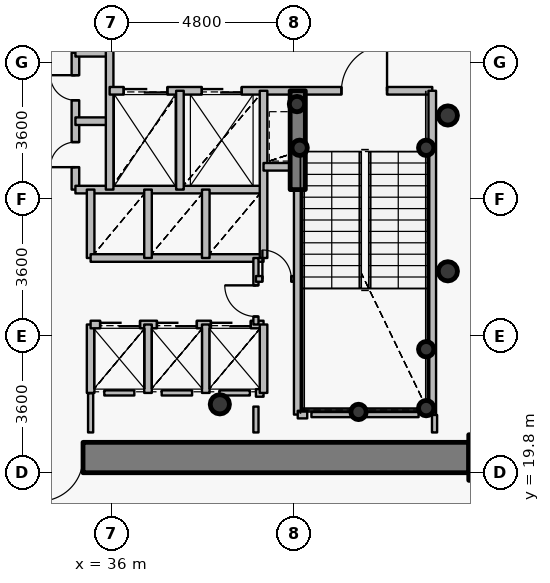
"""IFC4 building model, lengths in metres.
Left out: names, types, materials, properties, quantities, classifications, styles, units other than length and angle.
Written with IfcOpenShell. Run it as: python <this file> out.ifc"""

import sys

from ifc_helpers import new_model, si_unit, direction, frame, frame_2d, origin, origin_2d, place, context, subcontext, project, spatial, rectangle, hollow_circle, extrude, source, transform, mapped, element, fill, save


model = new_model("IFC4")
c1 = context("Model", 3, precision=1e-05, world=origin(), true_north=direction((0.0, 1.0)))
c2 = subcontext(c1, "Body", "Model", "MODEL_VIEW")
j1 = project(units=[si_unit("LENGTHUNIT", "METRE"), si_unit("PLANEANGLEUNIT", "RADIAN")], contexts=[c1])
p1 = place(None, origin())
s1 = spatial("IfcSite", under=j1, at=p1, CompositionType="ELEMENT")
p2 = place(p1, origin())
s2 = spatial("IfcBuilding", under=s1, at=p2, CompositionType="ELEMENT")
p3 = place(p2, frame((0.0, 0.0, 104.7)))
s3 = spatial("IfcBuildingStorey", under=s2, at=p3, CompositionType="ELEMENT", Elevation=104.7)
p4 = place(p3, frame((46.0, 20.2, 0.0), z_axis=(0.0, 0.0, 1.0), x_axis=(1.0, 0.0, 0.0)))
e1 = element("IfcColumn", 1, at=p4, inside=s3, PredefinedType="COLUMN", context=c2, shape_type="SweptSolid", body=[
    extrude(rectangle(XDim=1.2, YDim=1.2, at=origin_2d()), origin(), (0.0, 0.0, 1.0), 3.75),
])
p5 = place(p3, frame((38.85, 21.6, 0.0), z_axis=(0.0, 0.0, 1.0), x_axis=(1.0, 0.0, 0.0)))
e2 = element("IfcColumn", 2, at=p5, inside=s3, PredefinedType="COLUMN", context=c2, shape_type="SweptSolid", body=[
    extrude(hollow_circle(Radius=0.254, WallThickness=0.02, at=origin_2d()), origin(), (0.0, 0.0, 1.0), 3.75),
])
for number, where, z_axis, x_axis in (
    (3, (44.28, 21.5, 0.0), (0.0, 0.0, 1.0), (1.0, 0.0, 0.0)),
    (4, (44.28, 23.05, 0.0), (0.0, 0.0, 1.0), (1.0, 0.0, 0.0)),
    (5, (42.5, 21.4, 0.0), (0.0, 0.0, 1.0), (1.0, 0.0, 0.0)),
    (6, (40.95, 28.35, 0.0), (0.0, 0.0, 1.0), (1.0, 0.0, 0.0)),
    (7, (44.28, 28.35, 0.0), (0.0, 0.0, 1.0), (1.0, 0.0, 0.0)),
    (8, (40.88, 29.5, 0.0), (0.0, 0.0, 1.0), (1.0, 0.0, 0.0)),
):
    element("IfcColumn", number, at=place(p3, frame(where, z_axis=z_axis, x_axis=x_axis)), inside=s3, PredefinedType="COLUMN", context=c2, shape_type="SweptSolid", body=[
        extrude(hollow_circle(Radius=0.203, WallThickness=0.016, at=origin_2d()), origin(), (0.0, 0.0, 1.0), 3.75),
    ])
p6 = place(p3, frame((45.4, 20.2, 0.0), z_axis=(0.0, 0.0, 1.0), x_axis=(-1.0, 0.0, 0.0)))
e9 = element("IfcWall", 9, at=p6, inside=s3, PredefinedType="SHEAR", context=c2, shape_type="SweptSolid", body=[
    extrude(rectangle(XDim=18.8, YDim=0.8, at=frame_2d((9.4, 0.0))), origin(), (0.0, 0.0, 1.0), 2.95),
])
p7 = place(p6, frame((10.15, 0.0, 0.0)))
e10 = element("IfcOpeningElement", 10, at=p7, cuts=e9, PredefinedType="OPENING", context=c2, shape_type="SweptSolid", body=[
    extrude(rectangle(XDim=1.15, YDim=2.15, at=origin_2d()), frame((0.575, 0.41, 1.075), z_axis=(0.0, -1.0, 0.0), x_axis=(1.0, 0.0, 0.0)), (0.0, 0.0, 1.0), 0.82),
])
p8 = place(p3, frame((40.9, 27.25, 0.0), z_axis=(0.0, 0.0, 1.0), x_axis=(0.0, 1.0, 0.0)))
e11 = element("IfcWall", 11, at=p8, inside=s3, PredefinedType="SHEAR", context=c2, shape_type="SweptSolid", body=[
    extrude(rectangle(XDim=2.6, YDim=0.4, at=frame_2d((1.3, 0.0))), origin(), (0.0, 0.0, 1.0), 3.1),
])
for number, where, z_axis, x_axis in (
    (12, (44.85, 25.1, 0.0), (0.0, 0.0, 1.0), (1.0, 0.0, 0.0)),
    (13, (44.85, 29.2, 0.0), (0.0, 0.0, 1.0), (1.0, 0.0, 0.0)),
):
    element("IfcColumn", number, at=place(p3, frame(where, z_axis=z_axis, x_axis=x_axis)), inside=s3, PredefinedType="COLUMN", context=c2, shape_type="SweptSolid", body=[
        extrude(hollow_circle(Radius=0.254, WallThickness=0.02, at=origin_2d()), origin(), (0.0, 0.0, 1.0), 3.75),
    ])
p9 = place(p3, frame((35.05, 27.25, 0.0), z_axis=(0.0, 0.0, 1.0), x_axis=(0.0, 1.0, 0.0)))
e14 = element("IfcWall", 14, at=p9, inside=s3, PredefinedType="PARTITIONING", context=c2, shape_type="SweptSolid", body=[
    extrude(rectangle(XDim=3.6, YDim=0.2, at=frame_2d((1.8, 0.0))), origin(), (0.0, 0.0, 1.0), 3.5),
])
p10 = place(p9, frame((0.59, 0.0, 0.0)))
e15 = element("IfcOpeningElement", 15, at=p10, cuts=e14, PredefinedType="OPENING", context=c2, shape_type="SweptSolid", body=[
    extrude(rectangle(XDim=0.66, YDim=2.05, at=origin_2d()), frame((0.33, 0.11, 1.025), z_axis=(0.0, -1.0, 0.0), x_axis=(1.0, 0.0, 0.0)), (0.0, 0.0, 1.0), 0.22),
])
p11 = place(p9, frame((2.35, 0.0, 0.0)))
e16 = element("IfcOpeningElement", 16, at=p11, cuts=e14, PredefinedType="OPENING", context=c2, shape_type="SweptSolid", body=[
    extrude(rectangle(XDim=0.66, YDim=2.05, at=origin_2d()), frame((0.33, 0.11, 1.025), z_axis=(0.0, -1.0, 0.0), x_axis=(1.0, 0.0, 0.0)), (0.0, 0.0, 1.0), 0.22),
])
p12 = place(p3, frame((35.05, 27.25, 0.0), z_axis=(0.0, 0.0, 1.0), x_axis=(1.0, 0.0, 0.0)))
e17 = element("IfcWall", 17, at=p12, inside=s3, PredefinedType="PARTITIONING", context=c2, shape_type="SweptSolid", body=[
    extrude(rectangle(XDim=4.95, YDim=0.2, at=frame_2d((2.475, 0.0))), origin(), (0.0, 0.0, 1.0), 3.085),
])
for number, where, z_axis, x_axis in (
    (18, (35.05, 29.05, 0.0), (0.0, 0.0, 1.0), (1.0, 0.0, 0.0)),
    (19, (35.05, 30.85, 0.0), (0.0, 0.0, 1.0), (1.0, 0.0, 0.0)),
):
    element("IfcWall", number, at=place(p3, frame(where, z_axis=z_axis, x_axis=x_axis)), inside=s3, PredefinedType="PARTITIONING", context=c2, shape_type="SweptSolid", body=[
        extrude(rectangle(XDim=0.9, YDim=0.2, at=frame_2d((0.45, 0.0))), origin(), (0.0, 0.0, 1.0), 3.5),
    ])
p13 = place(p3, frame((35.45, 21.9, 0.0), z_axis=(0.0, 0.0, 1.0), x_axis=(0.0, 1.0, 0.0)))
e20 = element("IfcWall", 20, at=p13, inside=s3, PredefinedType="PARTITIONING", context=c2, shape_type="SweptSolid", body=[
    extrude(rectangle(XDim=1.8, YDim=0.2, at=frame_2d((0.9, 0.0))), origin(), (0.0, 0.0, 1.0), 3.5),
])
p14 = place(p3, frame((35.45, 23.7, 0.0), z_axis=(0.0, 0.0, 1.0), x_axis=(1.0, 0.0, 0.0)))
e21 = element("IfcWall", 21, at=p14, inside=s3, PredefinedType="PARTITIONING", context=c2, shape_type="SweptSolid", body=[
    extrude(rectangle(XDim=4.55, YDim=0.2, at=frame_2d((2.275, 0.0))), origin(), (0.0, 0.0, 1.0), 3.085),
])
p15 = place(p14, frame((0.25, 0.0, 0.0)))
e22 = element("IfcOpeningElement", 22, at=p15, cuts=e21, PredefinedType="OPENING", context=c2, shape_type="SweptSolid", body=[
    extrude(rectangle(XDim=1.05, YDim=2.15, at=origin_2d()), frame((0.525, 0.11, 1.075), z_axis=(0.0, -1.0, 0.0), x_axis=(1.0, 0.0, 0.0)), (0.0, 0.0, 1.0), 0.22),
])
p16 = place(p14, frame((1.745, 0.0, 0.0)))
e23 = element("IfcOpeningElement", 23, at=p16, cuts=e21, PredefinedType="OPENING", context=c2, shape_type="SweptSolid", body=[
    extrude(rectangle(XDim=1.05, YDim=2.15, at=origin_2d()), frame((0.525, 0.11, 1.075), z_axis=(0.0, -1.0, 0.0), x_axis=(1.0, 0.0, 0.0)), (0.0, 0.0, 1.0), 0.22),
])
p17 = place(p14, frame((3.165, 0.0, 0.0)))
e24 = element("IfcOpeningElement", 24, at=p17, cuts=e21, PredefinedType="OPENING", context=c2, shape_type="SweptSolid", body=[
    extrude(rectangle(XDim=1.05, YDim=2.15, at=origin_2d()), frame((0.525, 0.11, 1.075), z_axis=(0.0, -1.0, 0.0), x_axis=(1.0, 0.0, 0.0)), (0.0, 0.0, 1.0), 0.22),
])
p18 = place(p3, frame((35.45, 25.45, 0.0), z_axis=(0.0, 0.0, 1.0), x_axis=(0.0, 1.0, 0.0)))
e25 = element("IfcWall", 25, at=p18, inside=s3, PredefinedType="PARTITIONING", context=c2, shape_type="SweptSolid", body=[
    extrude(rectangle(XDim=1.8, YDim=0.2, at=frame_2d((0.9, 0.0))), origin(), (0.0, 0.0, 1.0), 3.5),
])
p19 = place(p3, frame((35.45, 25.45, 0.0), z_axis=(0.0, 0.0, 1.0), x_axis=(1.0, 0.0, 0.0)))
e26 = element("IfcWall", 26, at=p19, inside=s3, PredefinedType="PARTITIONING", context=c2, shape_type="SweptSolid", body=[
    extrude(rectangle(XDim=4.55, YDim=0.2, at=frame_2d((2.275, 0.0))), origin(), (0.0, 0.0, 1.0), 3.085),
])
p20 = place(p3, frame((35.95, 27.25, 0.0), z_axis=(0.0, 0.0, 1.0), x_axis=(0.0, 1.0, 0.0)))
e27 = element("IfcWall", 27, at=p20, inside=s3, PredefinedType="PARTITIONING", context=c2, shape_type="SweptSolid", body=[
    extrude(rectangle(XDim=3.8, YDim=0.2, at=frame_2d((1.9, 0.0))), origin(), (0.0, 0.0, 1.0), 3.5),
])
p21 = place(p3, frame((35.95, 29.85, 0.0), z_axis=(0.0, 0.0, 1.0), x_axis=(1.0, 0.0, 0.0)))
e28 = element("IfcWall", 28, at=p21, inside=s3, PredefinedType="PARTITIONING", context=c2, shape_type="SweptSolid", body=[
    extrude(rectangle(XDim=8.49, YDim=0.2, at=frame_2d((4.245, 0.0))), origin(), (0.0, 0.0, 1.0), 3.085),
])
p22 = place(p21, frame((6.1, 0.0, 0.0)))
e29 = element("IfcOpeningElement", 29, at=p22, cuts=e28, PredefinedType="OPENING", context=c2, shape_type="SweptSolid", body=[
    extrude(rectangle(XDim=1.2, YDim=2.15, at=origin_2d()), frame((0.6, 0.11, 1.075), z_axis=(0.0, -1.0, 0.0), x_axis=(1.0, 0.0, 0.0)), (0.0, 0.0, 1.0), 0.22),
])
p23 = place(p21, frame((0.37, 0.0, 0.0)))
e30 = element("IfcOpeningElement", 30, at=p23, cuts=e28, PredefinedType="OPENING", context=c2, shape_type="SweptSolid", body=[
    extrude(rectangle(XDim=1.15, YDim=2.15, at=origin_2d()), frame((0.575, 0.11, 1.075), z_axis=(0.0, -1.0, 0.0), x_axis=(1.0, 0.0, 0.0)), (0.0, 0.0, 1.0), 0.22),
])
p24 = place(p21, frame((2.425, 0.0, 0.0)))
e31 = element("IfcOpeningElement", 31, at=p24, cuts=e28, PredefinedType="OPENING", context=c2, shape_type="SweptSolid", body=[
    extrude(rectangle(XDim=1.05, YDim=2.15, at=origin_2d()), frame((0.525, 0.11, 1.075), z_axis=(0.0, -1.0, 0.0), x_axis=(1.0, 0.0, 0.0)), (0.0, 0.0, 1.0), 0.22),
])
for number, where, z_axis, x_axis in (
    (32, (36.96, 21.9, 0.0), (0.0, 0.0, 1.0), (0.0, 1.0, 0.0)),
    (33, (36.96, 25.45, 0.0), (0.0, 0.0, 1.0), (0.0, 1.0, 0.0)),
):
    element("IfcWall", number, at=place(p3, frame(where, z_axis=z_axis, x_axis=x_axis)), inside=s3, PredefinedType="PARTITIONING", context=c2, shape_type="SweptSolid", body=[
        extrude(rectangle(XDim=1.8, YDim=0.2, at=frame_2d((0.9, 0.0))), origin(), (0.0, 0.0, 1.0), 3.5),
    ])
p25 = place(p3, frame((37.8, 27.25, 0.0), z_axis=(0.0, 0.0, 1.0), x_axis=(0.0, 1.0, 0.0)))
e34 = element("IfcWall", 34, at=p25, inside=s3, PredefinedType="PARTITIONING", context=c2, shape_type="SweptSolid", body=[
    extrude(rectangle(XDim=2.6, YDim=0.2, at=frame_2d((1.3, 0.0))), origin(), (0.0, 0.0, 1.0), 3.5),
])
for number, where, z_axis, x_axis in (
    (35, (38.48, 21.9, 0.0), (0.0, 0.0, 1.0), (0.0, 1.0, 0.0)),
    (36, (38.48, 25.45, 0.0), (0.0, 0.0, 1.0), (0.0, 1.0, 0.0)),
):
    element("IfcWall", number, at=place(p3, frame(where, z_axis=z_axis, x_axis=x_axis)), inside=s3, PredefinedType="PARTITIONING", context=c2, shape_type="SweptSolid", body=[
        extrude(rectangle(XDim=1.8, YDim=0.2, at=frame_2d((0.9, 0.0))), origin(), (0.0, 0.0, 1.0), 3.5),
    ])
p26 = place(p3, frame((39.8, 21.9, 0.0), z_axis=(0.0, 0.0, 1.0), x_axis=(1.0, 0.0, 0.0)))
e37 = element("IfcWall", 37, at=p26, inside=s3, PredefinedType="PARTITIONING", context=c2, shape_type="SweptSolid", body=[
    extrude(rectangle(XDim=0.2, YDim=0.2, at=frame_2d((0.1, 0.0))), origin(), (0.0, 0.0, 1.0), 3.5),
])
p27 = place(p3, frame((39.8, 23.7, 0.0), z_axis=(0.0, 0.0, 1.0), x_axis=(0.0, 1.0, 0.0)))
e38 = element("IfcWall", 38, at=p27, inside=s3, PredefinedType="PARTITIONING", context=c2, shape_type="SweptSolid", body=[
    extrude(rectangle(XDim=1.75, YDim=0.135, at=frame_2d((0.875, 0.0))), origin(), (0.0, 0.0, 1.0), 3.5),
])
p28 = place(p27, frame((0.21, 0.0, 0.0)))
e39 = element("IfcOpeningElement", 39, at=p28, cuts=e38, PredefinedType="OPENING", context=c2, shape_type="SweptSolid", body=[
    extrude(rectangle(XDim=0.82, YDim=2.1, at=origin_2d()), frame((0.41, 0.078, 1.05), z_axis=(0.0, -1.0, 0.0), x_axis=(1.0, 0.0, 0.0)), (0.0, 0.0, 1.0), 0.155),
])
p29 = place(p3, frame((39.8, 24.9, 0.0), z_axis=(0.0, 0.0, 1.0), x_axis=(1.0, 0.0, 0.0)))
e40 = element("IfcWall", 40, at=p29, inside=s3, PredefinedType="PARTITIONING", context=c2, shape_type="SweptSolid", body=[
    extrude(rectangle(XDim=1.1, YDim=0.15, at=frame_2d((0.55, 0.0))), origin(), (0.0, 0.0, 1.0), 3.5),
])
p30 = place(p29, frame((0.17, 0.0, 0.0)))
e41 = element("IfcOpeningElement", 41, at=p30, cuts=e40, PredefinedType="OPENING", context=c2, shape_type="SweptSolid", body=[
    extrude(rectangle(XDim=0.76, YDim=2.1, at=origin_2d()), frame((0.38, 0.085, 1.05), z_axis=(0.0, -1.0, 0.0), x_axis=(1.0, 0.0, 0.0)), (0.0, 0.0, 1.0), 0.17),
])
p31 = place(p3, frame((40.0, 21.9, 0.0), z_axis=(0.0, 0.0, 1.0), x_axis=(0.0, 1.0, 0.0)))
e42 = element("IfcWall", 42, at=p31, inside=s3, PredefinedType="PARTITIONING", context=c2, shape_type="SweptSolid", body=[
    extrude(rectangle(XDim=1.8, YDim=0.2, at=frame_2d((0.9, 0.0))), origin(), (0.0, 0.0, 1.0), 3.5),
])
p32 = place(p3, frame((40.0, 25.45, 0.0), z_axis=(0.0, 0.0, 1.0), x_axis=(0.0, 1.0, 0.0)))
e43 = element("IfcWall", 43, at=p32, inside=s3, PredefinedType="PARTITIONING", context=c2, shape_type="SweptSolid", body=[
    extrude(rectangle(XDim=4.4, YDim=0.2, at=frame_2d((2.2, 0.0))), origin(), (0.0, 0.0, 1.0), 3.5),
])
p33 = place(p3, frame((40.0, 27.85, 0.0), z_axis=(0.0, 0.0, 1.0), x_axis=(1.0, 0.0, 0.0)))
e44 = element("IfcWall", 44, at=p33, inside=s3, PredefinedType="PARTITIONING", context=c2, shape_type="SweptSolid", body=[
    extrude(rectangle(XDim=0.9, YDim=0.2, at=frame_2d((0.45, 0.0))), origin(), (0.0, 0.0, 1.0), 3.5),
])
p34 = place(p3, frame((40.9, 21.33, 0.0), z_axis=(0.0, 0.0, 1.0), x_axis=(0.0, 1.0, 0.0)))
e45 = element("IfcWall", 45, at=p34, inside=s3, PredefinedType="PARTITIONING", context=c2, shape_type="SweptSolid", body=[
    extrude(rectangle(XDim=5.91, YDim=0.2, at=frame_2d((2.955, 0.0))), origin(), (0.0, 0.0, 1.0), 3.035),
])
p35 = place(p3, frame((40.9, 21.33, 0.0), z_axis=(0.0, 0.0, 1.0), x_axis=(1.0, 0.0, 0.0)))
e46 = element("IfcWall", 46, at=p35, inside=s3, PredefinedType="PARTITIONING", context=c2, shape_type="SweptSolid", body=[
    extrude(rectangle(XDim=0.25, YDim=0.2, at=frame_2d((0.125, 0.0))), origin(), (0.0, 0.0, 1.0), 3.035),
])
p36 = place(p3, frame((44.44, 21.33, 0.0), z_axis=(0.0, 0.0, 1.0), x_axis=(0.0, 1.0, 0.0)))
e47 = element("IfcWall", 47, at=p36, inside=s3, PredefinedType="PARTITIONING", context=c2, shape_type="SweptSolid", body=[
    extrude(rectangle(XDim=8.52, YDim=0.2, at=frame_2d((4.26, 0.0))), origin(), (0.0, 0.0, 1.0), 3.5),
])
p37 = place(p3, frame((44.08, 21.33, 0.0), z_axis=(0.0, 0.0, 1.0), x_axis=(-1.0, 0.0, 0.0)))
e48 = element("IfcWall", 48, at=p37, inside=s3, PredefinedType="PARTITIONING", context=c2, shape_type="SweptSolid", body=[
    extrude(rectangle(XDim=2.82, YDim=0.135, at=frame_2d((1.41, 0.0))), origin(), (0.0, 0.0, 1.0), 3.035),
])
p38 = place(p3, frame((36.6, 21.9, 0.0), z_axis=(0.0, 0.0, 1.0), x_axis=(-1.0, 0.0, 0.0)))
e49 = element("IfcWall", 49, at=p38, inside=s3, PredefinedType="PARTITIONING", context=c2, shape_type="SweptSolid", body=[
    extrude(rectangle(XDim=0.79, YDim=0.135, at=frame_2d((0.395, 0.0))), origin(), (0.0, 0.0, 1.0), 3.5),
])
p39 = place(p3, frame((38.12, 21.9, 0.0), z_axis=(0.0, 0.0, 1.0), x_axis=(-1.0, 0.0, 0.0)))
e50 = element("IfcWall", 50, at=p39, inside=s3, PredefinedType="PARTITIONING", context=c2, shape_type="SweptSolid", body=[
    extrude(rectangle(XDim=0.8, YDim=0.135, at=frame_2d((0.4, 0.0))), origin(), (0.0, 0.0, 1.0), 3.5),
])
p40 = place(p3, frame((39.64, 21.9, 0.0), z_axis=(0.0, 0.0, 1.0), x_axis=(-1.0, 0.0, 0.0)))
e51 = element("IfcWall", 51, at=p40, inside=s3, PredefinedType="PARTITIONING", context=c2, shape_type="SweptSolid", body=[
    extrude(rectangle(XDim=0.8, YDim=0.135, at=frame_2d((0.4, 0.0))), origin(), (0.0, 0.0, 1.0), 3.085),
])
p41 = place(p3, frame((39.8, 20.86, 0.0), z_axis=(0.0, 0.0, 1.0), x_axis=(0.0, 1.0, 0.0)))
e52 = element("IfcWall", 52, at=p41, inside=s3, PredefinedType="PARTITIONING", context=c2, shape_type="SweptSolid", body=[
    extrude(rectangle(XDim=0.68, YDim=0.135, at=frame_2d((0.34, 0.0))), origin(), (0.0, 0.0, 1.0), 3.035),
])
p42 = place(p3, frame((44.5, 20.86, 0.0), z_axis=(0.0, 0.0, 1.0), x_axis=(0.0, 1.0, 0.0)))
e53 = element("IfcWall", 53, at=p42, inside=s3, PredefinedType="PARTITIONING", context=c2, shape_type="SweptSolid", body=[
    extrude(rectangle(XDim=0.46, YDim=0.135, at=frame_2d((0.23, 0.0))), origin(), (0.0, 0.0, 1.0), 3.5),
])
p43 = place(p3, frame((35.45, 21.89, 0.0), z_axis=(0.0, 0.0, 1.0), x_axis=(0.0, -1.0, 0.0)))
e54 = element("IfcWall", 54, at=p43, inside=s3, PredefinedType="PARTITIONING", context=c2, shape_type="SweptSolid", body=[
    extrude(rectangle(XDim=1.03, YDim=0.135, at=frame_2d((0.515, 0.0))), origin(), (0.0, 0.0, 1.0), 3.085),
])
p44 = place(p3, frame((45.41, 19.8, 0.0), z_axis=(0.0, 0.0, 1.0), x_axis=(1.0, 0.0, 0.0)))
e55 = element("IfcWall", 55, at=p44, inside=s3, PredefinedType="PARTITIONING", context=c2, shape_type="SweptSolid", body=[
    extrude(rectangle(XDim=0.99, YDim=0.135, at=frame_2d((0.495, 0.0))), origin(), (0.0, 0.0, 1.0), 2.935),
])
m1 = source(origin(), c2, "Body", "SweptSolid", [
    extrude(rectangle(XDim=1.15, YDim=2.15, at=origin_2d()), frame((0.575, 0.025, 1.075), z_axis=(0.0, -1.0, 0.0), x_axis=(1.0, 0.0, 0.0)), (0.0, 0.0, 1.0), 0.05),
])
p45 = place(p7, origin())
e56 = element("IfcDoor", 56, at=p45, inside=s3, OperationType="SINGLE_SWING_RIGHT", PredefinedType="DOOR", context=c2, shape_type="MappedRepresentation", body=[
    mapped(m1, transform((0.0, 0.0, 0.0), x_axis=(1.0, 0.0, 0.0), y_axis=(0.0, 1.0, 0.0), z_axis=(0.0, 0.0, 1.0), scale=1.0)),
])
fill(e10, e56)
m2 = source(origin(), c2, "Body", "SweptSolid", [
    extrude(rectangle(XDim=1.2, YDim=2.15, at=origin_2d()), frame((0.6, 0.025, 1.075), z_axis=(0.0, -1.0, 0.0), x_axis=(1.0, 0.0, 0.0)), (0.0, 0.0, 1.0), 0.05),
])
p46 = place(p22, origin())
e57 = element("IfcDoor", 57, at=p46, inside=s3, OperationType="SINGLE_SWING_RIGHT", PredefinedType="DOOR", context=c2, shape_type="MappedRepresentation", body=[
    mapped(m2, transform((0.0, 0.0, 0.0), x_axis=(1.0, 0.0, 0.0), y_axis=(0.0, 1.0, 0.0), z_axis=(0.0, 0.0, 1.0), scale=1.0)),
])
fill(e29, e57)
m3 = source(origin(), c2, "Body", "SweptSolid", [
    extrude(rectangle(XDim=1.15, YDim=2.15, at=origin_2d()), frame((0.575, 0.025, 1.075), z_axis=(0.0, -1.0, 0.0), x_axis=(1.0, 0.0, 0.0)), (0.0, 0.0, 1.0), 0.05),
])
p47 = place(p23, origin())
e58 = element("IfcDoor", 58, at=p47, inside=s3, OperationType="DOUBLE_DOOR_SLIDING", PredefinedType="USERDEFINED", context=c2, shape_type="MappedRepresentation", body=[
    mapped(m3, transform((0.0, 0.0, 0.0), x_axis=(1.0, 0.0, 0.0), y_axis=(0.0, 1.0, 0.0), z_axis=(0.0, 0.0, 1.0), scale=1.0)),
])
fill(e30, e58)
m4 = source(origin(), c2, "Body", "SweptSolid", [
    extrude(rectangle(XDim=1.05, YDim=2.15, at=origin_2d()), frame((0.525, 0.025, 1.075), z_axis=(0.0, -1.0, 0.0), x_axis=(1.0, 0.0, 0.0)), (0.0, 0.0, 1.0), 0.05),
])
p48 = place(p24, origin())
e59 = element("IfcDoor", 59, at=p48, inside=s3, OperationType="DOUBLE_DOOR_SLIDING", PredefinedType="USERDEFINED", context=c2, shape_type="MappedRepresentation", body=[
    mapped(m4, transform((0.0, 0.0, 0.0), x_axis=(1.0, 0.0, 0.0), y_axis=(0.0, 1.0, 0.0), z_axis=(0.0, 0.0, 1.0), scale=1.0)),
])
fill(e31, e59)
p49 = place(p15, origin())
e60 = element("IfcDoor", 60, at=p49, inside=s3, OperationType="DOUBLE_DOOR_SLIDING", PredefinedType="USERDEFINED", context=c2, shape_type="MappedRepresentation", body=[
    mapped(m4, transform((0.0, 0.0, 0.0), x_axis=(1.0, 0.0, 0.0), y_axis=(0.0, 1.0, 0.0), z_axis=(0.0, 0.0, 1.0), scale=1.0)),
])
fill(e22, e60)
p50 = place(p16, origin())
e61 = element("IfcDoor", 61, at=p50, inside=s3, OperationType="DOUBLE_DOOR_SLIDING", PredefinedType="USERDEFINED", context=c2, shape_type="MappedRepresentation", body=[
    mapped(m4, transform((0.0, 0.0, 0.0), x_axis=(1.0, 0.0, 0.0), y_axis=(0.0, 1.0, 0.0), z_axis=(0.0, 0.0, 1.0), scale=1.0)),
])
fill(e23, e61)
p51 = place(p17, origin())
e62 = element("IfcDoor", 62, at=p51, inside=s3, OperationType="DOUBLE_DOOR_SLIDING", PredefinedType="USERDEFINED", context=c2, shape_type="MappedRepresentation", body=[
    mapped(m4, transform((0.0, 0.0, 0.0), x_axis=(1.0, 0.0, 0.0), y_axis=(0.0, 1.0, 0.0), z_axis=(0.0, 0.0, 1.0), scale=1.0)),
])
fill(e24, e62)
m5 = source(origin(), c2, "Body", "SweptSolid", [
    extrude(rectangle(XDim=0.66, YDim=2.05, at=origin_2d()), frame((0.33, 0.025, 1.025), z_axis=(0.0, -1.0, 0.0), x_axis=(1.0, 0.0, 0.0)), (0.0, 0.0, 1.0), 0.05),
])
p52 = place(p10, origin())
e63 = element("IfcDoor", 63, at=p52, inside=s3, OperationType="SINGLE_SWING_LEFT", PredefinedType="USERDEFINED", context=c2, shape_type="MappedRepresentation", body=[
    mapped(m5, transform((0.0, 0.0, 0.0), x_axis=(1.0, 0.0, 0.0), y_axis=(0.0, 1.0, 0.0), z_axis=(0.0, 0.0, 1.0), scale=1.0)),
])
fill(e15, e63)
p53 = place(p11, origin())
e64 = element("IfcDoor", 64, at=p53, inside=s3, OperationType="SINGLE_SWING_RIGHT", PredefinedType="USERDEFINED", context=c2, shape_type="MappedRepresentation", body=[
    mapped(m5, transform((0.0, 0.0, 0.0), x_axis=(1.0, 0.0, 0.0), y_axis=(0.0, 1.0, 0.0), z_axis=(0.0, 0.0, 1.0), scale=1.0)),
])
fill(e16, e64)
m6 = source(origin(), c2, "Body", "SweptSolid", [
    extrude(rectangle(XDim=0.82, YDim=2.1, at=origin_2d()), frame((0.41, 0.025, 1.05), z_axis=(0.0, -1.0, 0.0), x_axis=(1.0, 0.0, 0.0)), (0.0, 0.0, 1.0), 0.05),
])
p54 = place(p28, origin())
e65 = element("IfcDoor", 65, at=p54, inside=s3, OperationType="SINGLE_SWING_RIGHT", PredefinedType="DOOR", context=c2, shape_type="MappedRepresentation", body=[
    mapped(m6, transform((0.0, 0.0, 0.0), x_axis=(1.0, 0.0, 0.0), y_axis=(0.0, 1.0, 0.0), z_axis=(0.0, 0.0, 1.0), scale=1.0)),
])
fill(e39, e65)
m7 = source(origin(), c2, "Body", "SweptSolid", [
    extrude(rectangle(XDim=0.76, YDim=2.1, at=origin_2d()), frame((0.38, 0.025, 1.05), z_axis=(0.0, -1.0, 0.0), x_axis=(1.0, 0.0, 0.0)), (0.0, 0.0, 1.0), 0.05),
])
p55 = place(p30, origin())
e66 = element("IfcDoor", 66, at=p55, inside=s3, OperationType="SINGLE_SWING_LEFT", PredefinedType="DOOR", context=c2, shape_type="MappedRepresentation", body=[
    mapped(m7, transform((0.0, 0.0, 0.0), x_axis=(1.0, 0.0, 0.0), y_axis=(0.0, 1.0, 0.0), z_axis=(0.0, 0.0, 1.0), scale=1.0)),
])
fill(e41, e66)
save(model, sys.argv[1])
